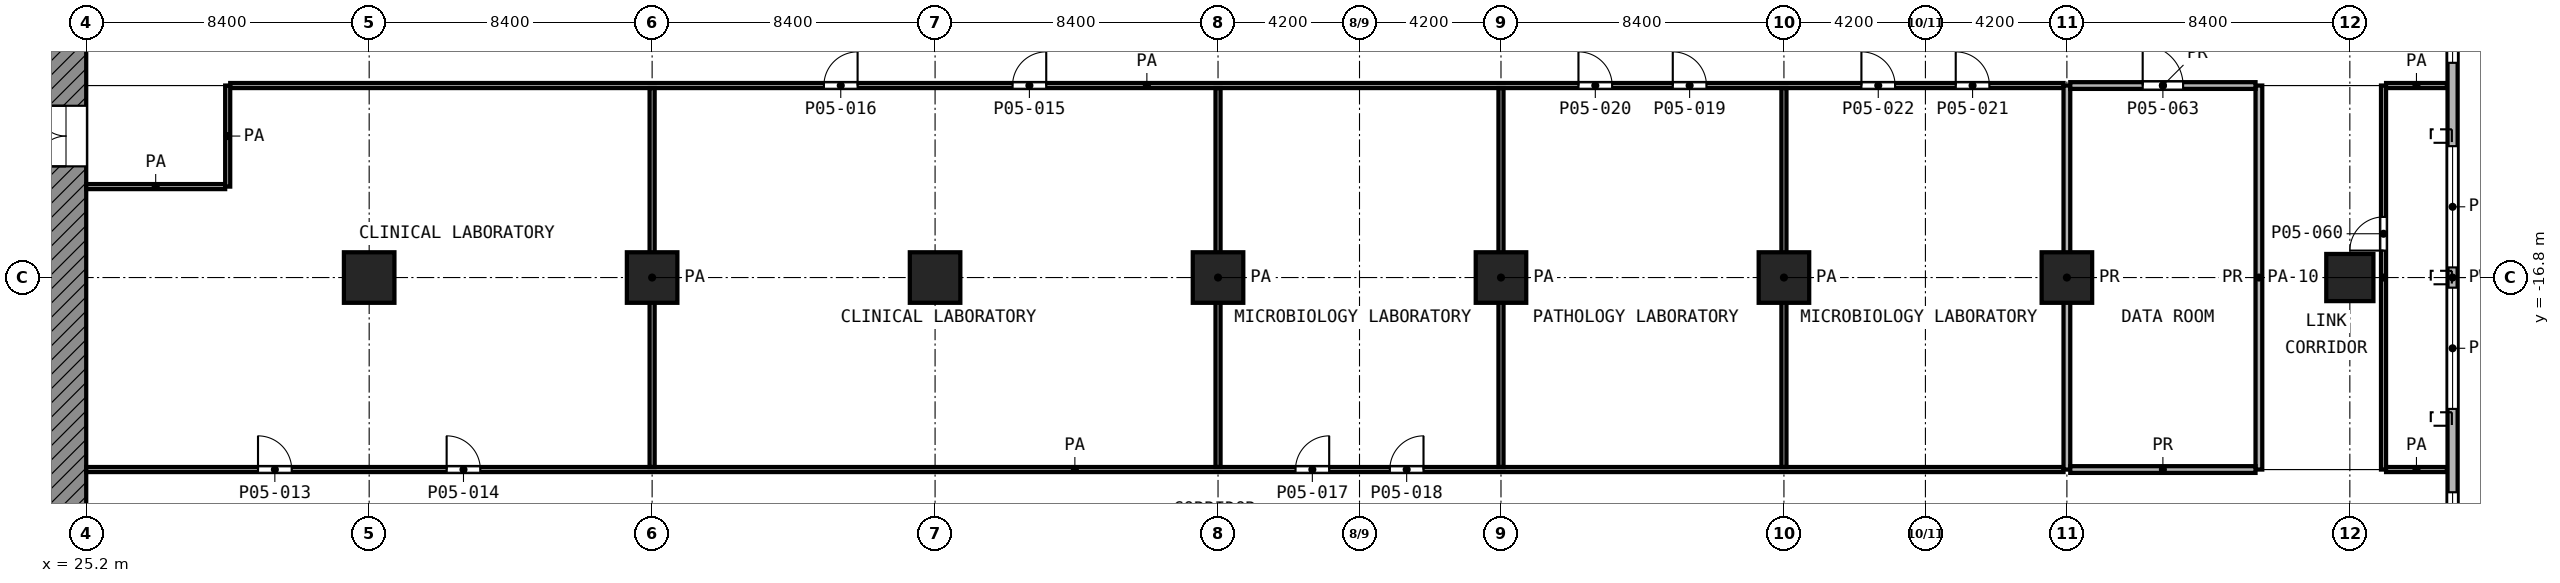
"""IFC4 building model, lengths in metres.
Left out: names, types, materials, properties, quantities, classifications, styles, units other than length and angle.
Written with IfcOpenShell. Run it as: python <this file> out.ifc"""

import sys

from ifc_helpers import new_model, si_unit, direction, frame, frame_2d, origin, origin_2d, place, context, subcontext, project, spatial, rectangle, extrude, element, fill, save


model = new_model("IFC4")
c1 = context("Model", 3, precision=1e-05, world=origin(), true_north=direction((0.0, 1.0)))
c2 = subcontext(c1, "Body", "Model", "MODEL_VIEW")
j1 = project(units=[si_unit("LENGTHUNIT", "METRE"), si_unit("PLANEANGLEUNIT", "RADIAN")], contexts=[c1])
p1 = place(None, origin())
s1 = spatial("IfcSite", under=j1, at=p1, CompositionType="ELEMENT")
p2 = place(p1, origin())
s2 = spatial("IfcBuilding", under=s1, at=p2, CompositionType="ELEMENT")
p3 = place(p2, frame((0.0, 0.0, 23.8)))
s3 = spatial("IfcBuildingStorey", under=s2, at=p3, CompositionType="ELEMENT", Elevation=23.8)
for number, where, z_axis, x_axis in (
    (1, (33.6, -16.8, 0.0), (0.0, 0.0, 1.0), (1.0, 0.0, 0.0)),
    (2, (42.0, -16.8, 0.0), (0.0, 0.0, 1.0), (1.0, 0.0, 0.0)),
    (3, (50.4, -16.8, 0.0), (0.0, 0.0, 1.0), (1.0, 0.0, 0.0)),
    (4, (58.8, -16.8, 0.0), (0.0, 0.0, 1.0), (1.0, 0.0, 0.0)),
    (5, (67.2, -16.8, 0.0), (0.0, 0.0, 1.0), (1.0, 0.0, 0.0)),
    (6, (75.6, -16.8, 0.0), (0.0, 0.0, 1.0), (1.0, 0.0, 0.0)),
    (7, (84.0, -16.8, 0.0), (0.0, 0.0, 1.0), (1.0, 0.0, 0.0)),
):
    element("IfcColumn", number, at=place(p3, frame(where, z_axis=z_axis, x_axis=x_axis)), inside=s3, PredefinedType="COLUMN", context=c2, shape_type="SweptSolid", body=[
        extrude(rectangle(XDim=1.5, YDim=1.5, at=origin_2d()), origin(), (0.0, 0.0, 1.0), 5.2),
    ])
p4 = place(p3, frame((92.4, -16.8, 0.0), z_axis=(0.0, 0.0, 1.0), x_axis=(1.0, 0.0, 0.0)))
e8 = element("IfcColumn", 8, at=p4, inside=s3, PredefinedType="COLUMN", context=c2, shape_type="SweptSolid", body=[
    extrude(rectangle(XDim=1.4, YDim=1.4, at=origin_2d()), origin(), (0.0, 0.0, 1.0), 5.2),
])
p5 = place(p3, frame((95.45, -30.738, 0.0), z_axis=(0.0, 0.0, 1.0), x_axis=(0.0, 1.0, 0.0)))
e9 = element("IfcWall", 9, at=p5, inside=s3, PredefinedType="SOLIDWALL", context=c2, shape_type="SweptSolid", body=[
    extrude(rectangle(XDim=27.876, YDim=0.3, at=frame_2d((13.938, 0.0))), origin(), (0.0, 0.0, 1.0), 4.85),
])
p6 = place(p5, frame((1.638, 0.0, 0.9)))
e10 = element("IfcOpeningElement", 10, at=p6, cuts=e9, PredefinedType="OPENING", context=c2, shape_type="SweptSolid", body=[
    extrude(rectangle(XDim=3.6, YDim=3.0, at=frame_2d((1.8, 1.5))), frame((0.0, 0.16, 0.0), z_axis=(0.0, -1.0, 0.0), x_axis=(1.0, 0.0, 0.0)), (0.0, 0.0, 1.0), 0.32),
])
p7 = place(p5, frame((6.363, 0.0, 0.9)))
e11 = element("IfcOpeningElement", 11, at=p7, cuts=e9, PredefinedType="OPENING", context=c2, shape_type="SweptSolid", body=[
    extrude(rectangle(XDim=1.2, YDim=3.0, at=frame_2d((0.6, 1.5))), frame((0.0, 0.16, 0.0), z_axis=(0.0, -1.0, 0.0), x_axis=(1.0, 0.0, 0.0)), (0.0, 0.0, 1.0), 0.32),
])
p8 = place(p5, frame((10.038, 0.0, 0.9)))
e12 = element("IfcOpeningElement", 12, at=p8, cuts=e9, PredefinedType="OPENING", context=c2, shape_type="SweptSolid", body=[
    extrude(rectangle(XDim=3.6, YDim=3.0, at=frame_2d((1.8, 1.5))), frame((0.0, 0.16, 0.0), z_axis=(0.0, -1.0, 0.0), x_axis=(1.0, 0.0, 0.0)), (0.0, 0.0, 1.0), 0.32),
])
p9 = place(p5, frame((14.238, 0.0, 0.9)))
e13 = element("IfcOpeningElement", 13, at=p9, cuts=e9, PredefinedType="OPENING", context=c2, shape_type="SweptSolid", body=[
    extrude(rectangle(XDim=3.6, YDim=3.0, at=frame_2d((1.8, 1.5))), frame((0.0, 0.16, 0.0), z_axis=(0.0, -1.0, 0.0), x_axis=(1.0, 0.0, 0.0)), (0.0, 0.0, 1.0), 0.32),
])
p10 = place(p5, frame((20.313, 0.0, 0.9)))
e14 = element("IfcOpeningElement", 14, at=p10, cuts=e9, PredefinedType="OPENING", context=c2, shape_type="SweptSolid", body=[
    extrude(rectangle(XDim=1.2, YDim=3.0, at=frame_2d((0.6, 1.5))), frame((0.0, 0.16, 0.0), z_axis=(0.0, -1.0, 0.0), x_axis=(1.0, 0.0, 0.0)), (0.0, 0.0, 1.0), 0.32),
])
p11 = place(p5, frame((22.638, 0.0, 0.9)))
e15 = element("IfcOpeningElement", 15, at=p11, cuts=e9, PredefinedType="OPENING", context=c2, shape_type="SweptSolid", body=[
    extrude(rectangle(XDim=3.6, YDim=3.0, at=frame_2d((1.8, 1.5))), frame((0.0, 0.16, 0.0), z_axis=(0.0, -1.0, 0.0), x_axis=(1.0, 0.0, 0.0)), (0.0, 0.0, 1.0), 0.32),
])
p12 = place(p3, frame((24.6, -24.0, 0.0), z_axis=(0.0, 0.0, 1.0), x_axis=(0.0, 1.0, 0.0)))
e16 = element("IfcWall", 16, at=p12, inside=s3, PredefinedType="SHEAR", context=c2, shape_type="SweptSolid", body=[
    extrude(rectangle(XDim=18.6, YDim=1.2, at=frame_2d((9.3, 0.0))), origin(), (0.0, 0.0, 1.0), 4.85),
])
p13 = place(p12, frame((10.5, 0.0, 0.0)))
e17 = element("IfcOpeningElement", 17, at=p13, cuts=e16, PredefinedType="OPENING", context=c2, shape_type="SweptSolid", body=[
    extrude(rectangle(XDim=1.8, YDim=2.1, at=frame_2d((0.9, 1.05))), frame((0.0, 0.61, 0.0), z_axis=(0.0, -1.0, 0.0), x_axis=(1.0, 0.0, 0.0)), (0.0, 0.0, 1.0), 1.22),
])
p14 = place(p3, frame((25.2, -22.5, 0.0), z_axis=(0.0, 0.0, 1.0), x_axis=(1.0, 0.0, 0.0)))
e18 = element("IfcWall", 18, at=p14, inside=s3, PredefinedType="PARTITIONING", context=c2, shape_type="SweptSolid", body=[
    extrude(rectangle(XDim=58.7, YDim=0.15, at=frame_2d((29.35, 0.0))), origin(), (0.0, 0.0, 1.0), 4.85),
])
p15 = place(p14, frame((5.1, 0.0, 0.0)))
e19 = element("IfcOpeningElement", 19, at=p15, cuts=e18, PredefinedType="OPENING", context=c2, shape_type="SweptSolid", body=[
    extrude(rectangle(XDim=1.0, YDim=2.1, at=frame_2d((0.5, 1.05))), frame((0.0, 0.085, 0.0), z_axis=(0.0, -1.0, 0.0), x_axis=(1.0, 0.0, 0.0)), (0.0, 0.0, 1.0), 0.17),
])
p16 = place(p14, frame((10.7, 0.0, 0.0)))
e20 = element("IfcOpeningElement", 20, at=p16, cuts=e18, PredefinedType="OPENING", context=c2, shape_type="SweptSolid", body=[
    extrude(rectangle(XDim=1.0, YDim=2.1, at=frame_2d((0.5, 1.05))), frame((0.0, 0.085, 0.0), z_axis=(0.0, -1.0, 0.0), x_axis=(1.0, 0.0, 0.0)), (0.0, 0.0, 1.0), 0.17),
])
p17 = place(p14, frame((35.9, 0.0, 0.0)))
e21 = element("IfcOpeningElement", 21, at=p17, cuts=e18, PredefinedType="OPENING", context=c2, shape_type="SweptSolid", body=[
    extrude(rectangle(XDim=1.0, YDim=2.1, at=frame_2d((0.5, 1.05))), frame((0.0, 0.085, 0.0), z_axis=(0.0, -1.0, 0.0), x_axis=(1.0, 0.0, 0.0)), (0.0, 0.0, 1.0), 0.17),
])
p18 = place(p14, frame((38.7, 0.0, 0.0)))
e22 = element("IfcOpeningElement", 22, at=p18, cuts=e18, PredefinedType="OPENING", context=c2, shape_type="SweptSolid", body=[
    extrude(rectangle(XDim=1.0, YDim=2.1, at=frame_2d((0.5, 1.05))), frame((0.0, 0.085, 0.0), z_axis=(0.0, -1.0, 0.0), x_axis=(1.0, 0.0, 0.0)), (0.0, 0.0, 1.0), 0.17),
])
p19 = place(p3, frame((93.475, -22.5, 0.0), z_axis=(0.0, 0.0, 1.0), x_axis=(1.0, 0.0, 0.0)))
e23 = element("IfcWall", 23, at=p19, inside=s3, PredefinedType="PARTITIONING", context=c2, shape_type="SweptSolid", body=[
    extrude(rectangle(XDim=1.805, YDim=0.15, at=frame_2d((0.902, 0.0))), origin(), (0.0, 0.0, 1.0), 4.85),
])
p20 = place(p3, frame((25.2, -14.1, 0.0), z_axis=(0.0, 0.0, 1.0), x_axis=(1.0, 0.0, 0.0)))
e24 = element("IfcWall", 24, at=p20, inside=s3, PredefinedType="PARTITIONING", context=c2, shape_type="SweptSolid", body=[
    extrude(rectangle(XDim=4.125, YDim=0.15, at=frame_2d((2.062, 0.0))), origin(), (0.0, 0.0, 1.0), 4.85),
])
p21 = place(p3, frame((29.475, -11.1, 0.0), z_axis=(0.0, 0.0, 1.0), x_axis=(1.0, 0.0, 0.0)))
e25 = element("IfcWall", 25, at=p21, inside=s3, PredefinedType="PARTITIONING", context=c2, shape_type="SweptSolid", body=[
    extrude(rectangle(XDim=54.425, YDim=0.15, at=frame_2d((27.212, 0.0))), origin(), (0.0, 0.0, 1.0), 4.85),
])
p22 = place(p21, frame((23.225, 0.0, 0.0)))
e26 = element("IfcOpeningElement", 26, at=p22, cuts=e25, PredefinedType="OPENING", context=c2, shape_type="SweptSolid", body=[
    extrude(rectangle(XDim=1.0, YDim=2.1, at=frame_2d((0.5, 1.05))), frame((0.0, 0.085, 0.0), z_axis=(0.0, -1.0, 0.0), x_axis=(1.0, 0.0, 0.0)), (0.0, 0.0, 1.0), 0.17),
])
p23 = place(p21, frame((17.625, 0.0, 0.0)))
e27 = element("IfcOpeningElement", 27, at=p23, cuts=e25, PredefinedType="OPENING", context=c2, shape_type="SweptSolid", body=[
    extrude(rectangle(XDim=1.0, YDim=2.1, at=frame_2d((0.5, 1.05))), frame((0.0, 0.085, 0.0), z_axis=(0.0, -1.0, 0.0), x_axis=(1.0, 0.0, 0.0)), (0.0, 0.0, 1.0), 0.17),
])
p24 = place(p21, frame((42.825, 0.0, 0.0)))
e28 = element("IfcOpeningElement", 28, at=p24, cuts=e25, PredefinedType="OPENING", context=c2, shape_type="SweptSolid", body=[
    extrude(rectangle(XDim=1.0, YDim=2.1, at=frame_2d((0.5, 1.05))), frame((0.0, 0.085, 0.0), z_axis=(0.0, -1.0, 0.0), x_axis=(1.0, 0.0, 0.0)), (0.0, 0.0, 1.0), 0.17),
])
p25 = place(p21, frame((40.025, 0.0, 0.0)))
e29 = element("IfcOpeningElement", 29, at=p25, cuts=e25, PredefinedType="OPENING", context=c2, shape_type="SweptSolid", body=[
    extrude(rectangle(XDim=1.0, YDim=2.1, at=frame_2d((0.5, 1.05))), frame((0.0, 0.085, 0.0), z_axis=(0.0, -1.0, 0.0), x_axis=(1.0, 0.0, 0.0)), (0.0, 0.0, 1.0), 0.17),
])
p26 = place(p21, frame((51.225, 0.0, 0.0)))
e30 = element("IfcOpeningElement", 30, at=p26, cuts=e25, PredefinedType="OPENING", context=c2, shape_type="SweptSolid", body=[
    extrude(rectangle(XDim=1.0, YDim=2.1, at=frame_2d((0.5, 1.05))), frame((0.0, 0.085, 0.0), z_axis=(0.0, -1.0, 0.0), x_axis=(1.0, 0.0, 0.0)), (0.0, 0.0, 1.0), 0.17),
])
p27 = place(p21, frame((48.425, 0.0, 0.0)))
e31 = element("IfcOpeningElement", 31, at=p27, cuts=e25, PredefinedType="OPENING", context=c2, shape_type="SweptSolid", body=[
    extrude(rectangle(XDim=1.0, YDim=2.1, at=frame_2d((0.5, 1.05))), frame((0.0, 0.085, 0.0), z_axis=(0.0, -1.0, 0.0), x_axis=(1.0, 0.0, 0.0)), (0.0, 0.0, 1.0), 0.17),
])
p28 = place(p3, frame((93.475, -11.1, 0.0), z_axis=(0.0, 0.0, 1.0), x_axis=(1.0, 0.0, 0.0)))
e32 = element("IfcWall", 32, at=p28, inside=s3, PredefinedType="PARTITIONING", context=c2, shape_type="SweptSolid", body=[
    extrude(rectangle(XDim=1.805, YDim=0.15, at=frame_2d((0.902, 0.0))), origin(), (0.0, 0.0, 1.0), 4.85),
])
p29 = place(p3, frame((29.4, -14.1, 0.0), z_axis=(0.0, 0.0, 1.0), x_axis=(0.0, 1.0, 0.0)))
e33 = element("IfcWall", 33, at=p29, inside=s3, PredefinedType="PARTITIONING", context=c2, shape_type="SweptSolid", body=[
    extrude(rectangle(XDim=3.0, YDim=0.15, at=frame_2d((1.5, 0.0))), origin(), (0.0, 0.0, 1.0), 4.85),
])
for number, where, z_axis, x_axis in (
    (34, (42.0, -22.425, 0.0), (0.0, 0.0, 1.0), (0.0, 1.0, 0.0)),
    (35, (58.8, -22.425, 0.0), (0.0, 0.0, 1.0), (0.0, 1.0, 0.0)),
    (36, (67.2, -22.425, 0.0), (0.0, 0.0, 1.0), (0.0, 1.0, 0.0)),
    (37, (75.6, -22.425, 0.0), (0.0, 0.0, 1.0), (0.0, 1.0, 0.0)),
):
    element("IfcWall", number, at=place(p3, frame(where, z_axis=z_axis, x_axis=x_axis)), inside=s3, PredefinedType="PARTITIONING", context=c2, shape_type="SweptSolid", body=[
        extrude(rectangle(XDim=11.25, YDim=0.15, at=frame_2d((5.625, 0.0))), origin(), (0.0, 0.0, 1.0), 4.85),
    ])
p30 = place(p3, frame((93.4, -22.5, 0.0), z_axis=(0.0, 0.0, 1.0), x_axis=(0.0, 1.0, 0.0)))
e38 = element("IfcWall", 38, at=p30, inside=s3, PredefinedType="PARTITIONING", context=c2, shape_type="SweptSolid", body=[
    extrude(rectangle(XDim=11.4, YDim=0.15, at=frame_2d((5.7, 0.0))), origin(), (0.0, 0.0, 1.0), 3.95),
])
p31 = place(p30, frame((6.5, 0.0, 0.0)))
e39 = element("IfcOpeningElement", 39, at=p31, cuts=e38, PredefinedType="OPENING", context=c2, shape_type="SweptSolid", body=[
    extrude(rectangle(XDim=1.0, YDim=2.1, at=frame_2d((0.5, 1.05))), frame((0.0, 0.085, 0.0), z_axis=(0.0, -1.0, 0.0), x_axis=(1.0, 0.0, 0.0)), (0.0, 0.0, 1.0), 0.17),
])
p32 = place(p3, frame((84.1, -22.5, 0.0), z_axis=(0.0, 0.0, 1.0), x_axis=(1.0, 0.0, 0.0)))
e40 = element("IfcWall", 40, at=p32, inside=s3, PredefinedType="PARTITIONING", context=c2, shape_type="SweptSolid", body=[
    extrude(rectangle(XDim=5.5, YDim=0.2, at=frame_2d((2.75, 0.0))), origin(), (0.0, 0.0, 1.0), 4.85),
])
p33 = place(p3, frame((84.1, -11.1, 0.0), z_axis=(0.0, 0.0, 1.0), x_axis=(1.0, 0.0, 0.0)))
e41 = element("IfcWall", 41, at=p33, inside=s3, PredefinedType="PARTITIONING", context=c2, shape_type="SweptSolid", body=[
    extrude(rectangle(XDim=5.5, YDim=0.2, at=frame_2d((2.75, 0.0))), origin(), (0.0, 0.0, 1.0), 4.85),
])
p34 = place(p33, frame((2.15, 0.0, 0.0)))
e42 = element("IfcOpeningElement", 42, at=p34, cuts=e41, PredefinedType="OPENING", context=c2, shape_type="SweptSolid", body=[
    extrude(rectangle(XDim=1.2, YDim=2.1, at=frame_2d((0.6, 1.05))), frame((0.0, 0.11, 0.0), z_axis=(0.0, -1.0, 0.0), x_axis=(1.0, 0.0, 0.0)), (0.0, 0.0, 1.0), 0.22),
])
for number, where, z_axis, x_axis in (
    (43, (84.0, -22.5, 0.0), (0.0, 0.0, 1.0), (0.0, 1.0, 0.0)),
    (44, (89.7, -22.5, 0.0), (0.0, 0.0, 1.0), (0.0, 1.0, 0.0)),
):
    element("IfcWall", number, at=place(p3, frame(where, z_axis=z_axis, x_axis=x_axis)), inside=s3, PredefinedType="PARTITIONING", context=c2, shape_type="SweptSolid", body=[
        extrude(rectangle(XDim=11.4, YDim=0.2, at=frame_2d((5.7, 0.0))), origin(), (0.0, 0.0, 1.0), 4.85),
    ])
p35 = place(p7, origin())
e45 = element("IfcWindow", 45, at=p35, inside=s3, PartitioningType="SINGLE_PANEL", PredefinedType="WINDOW", context=c2, shape_type="SweptSolid", body=[
    extrude(rectangle(XDim=1.2, YDim=3.0, at=frame_2d((0.6, 1.5))), frame((0.0, 0.03, 0.0), z_axis=(0.0, -1.0, 0.0), x_axis=(1.0, 0.0, 0.0)), (0.0, 0.0, 1.0), 0.06),
])
fill(e11, e45)
p36 = place(p8, origin())
e46 = element("IfcWindow", 46, at=p36, inside=s3, PartitioningType="SINGLE_PANEL", PredefinedType="WINDOW", context=c2, shape_type="SweptSolid", body=[
    extrude(rectangle(XDim=3.6, YDim=3.0, at=frame_2d((1.8, 1.5))), frame((0.0, 0.03, 0.0), z_axis=(0.0, -1.0, 0.0), x_axis=(1.0, 0.0, 0.0)), (0.0, 0.0, 1.0), 0.06),
])
fill(e12, e46)
p37 = place(p9, origin())
e47 = element("IfcWindow", 47, at=p37, inside=s3, PartitioningType="SINGLE_PANEL", PredefinedType="WINDOW", context=c2, shape_type="SweptSolid", body=[
    extrude(rectangle(XDim=3.6, YDim=3.0, at=frame_2d((1.8, 1.5))), frame((0.0, 0.03, 0.0), z_axis=(0.0, -1.0, 0.0), x_axis=(1.0, 0.0, 0.0)), (0.0, 0.0, 1.0), 0.06),
])
fill(e13, e47)
p38 = place(p10, origin())
e48 = element("IfcWindow", 48, at=p38, inside=s3, PartitioningType="SINGLE_PANEL", PredefinedType="WINDOW", context=c2, shape_type="SweptSolid", body=[
    extrude(rectangle(XDim=1.2, YDim=3.0, at=frame_2d((0.6, 1.5))), frame((0.0, 0.03, 0.0), z_axis=(0.0, -1.0, 0.0), x_axis=(1.0, 0.0, 0.0)), (0.0, 0.0, 1.0), 0.06),
])
fill(e14, e48)
p39 = place(p13, origin())
e49 = element("IfcDoor", 49, at=p39, inside=s3, OperationType="DOUBLE_DOOR_SINGLE_SWING", PredefinedType="DOOR", context=c2, shape_type="SweptSolid", body=[
    extrude(rectangle(XDim=1.8, YDim=2.1, at=frame_2d((0.9, 1.05))), frame((0.0, 0.025, 0.0), z_axis=(0.0, -1.0, 0.0), x_axis=(1.0, 0.0, 0.0)), (0.0, 0.0, 1.0), 0.05),
])
fill(e17, e49)
p40 = place(p15, origin())
e50 = element("IfcDoor", 50, at=p40, inside=s3, OperationType="SINGLE_SWING_LEFT", PredefinedType="DOOR", context=c2, shape_type="SweptSolid", body=[
    extrude(rectangle(XDim=1.0, YDim=2.1, at=frame_2d((0.5, 1.05))), frame((0.0, 0.025, 0.0), z_axis=(0.0, -1.0, 0.0), x_axis=(1.0, 0.0, 0.0)), (0.0, 0.0, 1.0), 0.05),
])
fill(e19, e50)
p41 = place(p16, origin())
e51 = element("IfcDoor", 51, at=p41, inside=s3, OperationType="SINGLE_SWING_LEFT", PredefinedType="DOOR", context=c2, shape_type="SweptSolid", body=[
    extrude(rectangle(XDim=1.0, YDim=2.1, at=frame_2d((0.5, 1.05))), frame((0.0, 0.025, 0.0), z_axis=(0.0, -1.0, 0.0), x_axis=(1.0, 0.0, 0.0)), (0.0, 0.0, 1.0), 0.05),
])
fill(e20, e51)
p42 = place(p22, origin())
e52 = element("IfcDoor", 52, at=p42, inside=s3, OperationType="SINGLE_SWING_RIGHT", PredefinedType="DOOR", context=c2, shape_type="SweptSolid", body=[
    extrude(rectangle(XDim=1.0, YDim=2.1, at=frame_2d((0.5, 1.05))), frame((0.0, 0.025, 0.0), z_axis=(0.0, -1.0, 0.0), x_axis=(1.0, 0.0, 0.0)), (0.0, 0.0, 1.0), 0.05),
])
fill(e26, e52)
p43 = place(p23, origin())
e53 = element("IfcDoor", 53, at=p43, inside=s3, OperationType="SINGLE_SWING_RIGHT", PredefinedType="DOOR", context=c2, shape_type="SweptSolid", body=[
    extrude(rectangle(XDim=1.0, YDim=2.1, at=frame_2d((0.5, 1.05))), frame((0.0, 0.025, 0.0), z_axis=(0.0, -1.0, 0.0), x_axis=(1.0, 0.0, 0.0)), (0.0, 0.0, 1.0), 0.05),
])
fill(e27, e53)
p44 = place(p17, origin())
e54 = element("IfcDoor", 54, at=p44, inside=s3, OperationType="SINGLE_SWING_RIGHT", PredefinedType="DOOR", context=c2, shape_type="SweptSolid", body=[
    extrude(rectangle(XDim=1.0, YDim=2.1, at=frame_2d((0.5, 1.05))), frame((0.0, 0.025, 0.0), z_axis=(0.0, -1.0, 0.0), x_axis=(1.0, 0.0, 0.0)), (0.0, 0.0, 1.0), 0.05),
])
fill(e21, e54)
p45 = place(p18, origin())
e55 = element("IfcDoor", 55, at=p45, inside=s3, OperationType="SINGLE_SWING_RIGHT", PredefinedType="DOOR", context=c2, shape_type="SweptSolid", body=[
    extrude(rectangle(XDim=1.0, YDim=2.1, at=frame_2d((0.5, 1.05))), frame((0.0, 0.025, 0.0), z_axis=(0.0, -1.0, 0.0), x_axis=(1.0, 0.0, 0.0)), (0.0, 0.0, 1.0), 0.05),
])
fill(e22, e55)
p46 = place(p24, origin())
e56 = element("IfcDoor", 56, at=p46, inside=s3, OperationType="SINGLE_SWING_LEFT", PredefinedType="DOOR", context=c2, shape_type="SweptSolid", body=[
    extrude(rectangle(XDim=1.0, YDim=2.1, at=frame_2d((0.5, 1.05))), frame((0.0, 0.025, 0.0), z_axis=(0.0, -1.0, 0.0), x_axis=(1.0, 0.0, 0.0)), (0.0, 0.0, 1.0), 0.05),
])
fill(e28, e56)
p47 = place(p25, origin())
e57 = element("IfcDoor", 57, at=p47, inside=s3, OperationType="SINGLE_SWING_LEFT", PredefinedType="DOOR", context=c2, shape_type="SweptSolid", body=[
    extrude(rectangle(XDim=1.0, YDim=2.1, at=frame_2d((0.5, 1.05))), frame((0.0, 0.025, 0.0), z_axis=(0.0, -1.0, 0.0), x_axis=(1.0, 0.0, 0.0)), (0.0, 0.0, 1.0), 0.05),
])
fill(e29, e57)
p48 = place(p26, origin())
e58 = element("IfcDoor", 58, at=p48, inside=s3, OperationType="SINGLE_SWING_LEFT", PredefinedType="DOOR", context=c2, shape_type="SweptSolid", body=[
    extrude(rectangle(XDim=1.0, YDim=2.1, at=frame_2d((0.5, 1.05))), frame((0.0, 0.025, 0.0), z_axis=(0.0, -1.0, 0.0), x_axis=(1.0, 0.0, 0.0)), (0.0, 0.0, 1.0), 0.05),
])
fill(e30, e58)
p49 = place(p27, origin())
e59 = element("IfcDoor", 59, at=p49, inside=s3, OperationType="SINGLE_SWING_LEFT", PredefinedType="DOOR", context=c2, shape_type="SweptSolid", body=[
    extrude(rectangle(XDim=1.0, YDim=2.1, at=frame_2d((0.5, 1.05))), frame((0.0, 0.025, 0.0), z_axis=(0.0, -1.0, 0.0), x_axis=(1.0, 0.0, 0.0)), (0.0, 0.0, 1.0), 0.05),
])
fill(e31, e59)
p50 = place(p34, origin())
e60 = element("IfcDoor", 60, at=p50, inside=s3, OperationType="SINGLE_SWING_LEFT", PredefinedType="DOOR", context=c2, shape_type="SweptSolid", body=[
    extrude(rectangle(XDim=1.2, YDim=2.1, at=frame_2d((0.6, 1.05))), frame((0.0, 0.025, 0.0), z_axis=(0.0, -1.0, 0.0), x_axis=(1.0, 0.0, 0.0)), (0.0, 0.0, 1.0), 0.05),
])
fill(e42, e60)
p51 = place(p31, origin())
e61 = element("IfcDoor", 61, at=p51, inside=s3, OperationType="SINGLE_SWING_LEFT", PredefinedType="DOOR", context=c2, shape_type="SweptSolid", body=[
    extrude(rectangle(XDim=1.0, YDim=2.1, at=frame_2d((0.5, 1.05))), frame((0.0, 0.025, 0.0), z_axis=(0.0, -1.0, 0.0), x_axis=(1.0, 0.0, 0.0)), (0.0, 0.0, 1.0), 0.05),
])
fill(e39, e61)
save(model, sys.argv[1])
